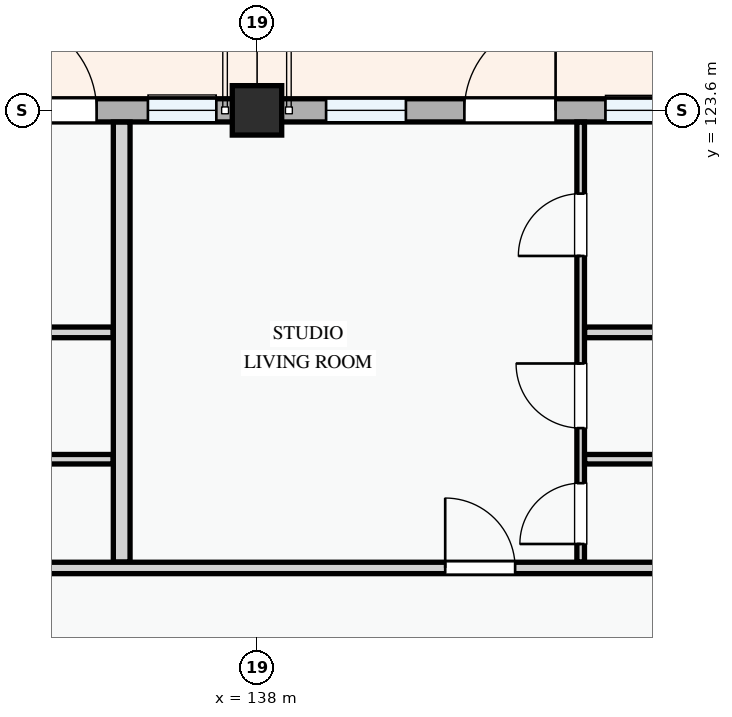
"""IFC4 building model, lengths in metres.
Left out: names, types, materials, properties, quantities, classifications, styles, units other than length and angle.
Written with IfcOpenShell. Run it as: python <this file> out.ifc"""

import sys

from ifc_helpers import new_model, si_unit, direction, frame, frame_2d, origin, origin_2d, place, context, subcontext, project, spatial, rectangle, extrude, element, fill, save


model = new_model("IFC4")
c1 = context("Model", 3, precision=1e-05, world=origin(), true_north=direction((0.0, 1.0)))
c2 = subcontext(c1, "Body", "Model", "MODEL_VIEW")
j1 = project(units=[si_unit("LENGTHUNIT", "METRE"), si_unit("PLANEANGLEUNIT", "RADIAN")], contexts=[c1])
p1 = place(None, origin())
s1 = spatial("IfcSite", under=j1, at=p1, CompositionType="ELEMENT")
p2 = place(p1, origin())
s2 = spatial("IfcBuilding", under=s1, at=p2, CompositionType="ELEMENT")
p3 = place(p2, frame((0.0, 0.0, 21.3)))
s3 = spatial("IfcBuildingStorey", under=s2, at=p3, CompositionType="ELEMENT", Elevation=21.3)
p4 = place(p3, frame((138.0, 123.6, 0.0), z_axis=(0.0, 0.0, 1.0), x_axis=(1.0, 0.0, 0.0)))
e1 = element("IfcColumn", 1, at=p4, inside=s3, PredefinedType="COLUMN", context=c2, shape_type="SweptSolid", body=[
    extrude(rectangle(XDim=0.65, YDim=0.65, at=origin_2d()), origin(), (0.0, 0.0, 1.0), 3.3),
])
p5 = place(p3, frame((144.0, 123.6, 0.0), z_axis=(0.0, 0.0, 1.0), x_axis=(-1.0, 0.0, 0.0)))
e2 = element("IfcWall", 2, at=p5, inside=s3, PredefinedType="STANDARD", context=c2, shape_type="SweptSolid", body=[
    extrude(rectangle(XDim=6.0, YDim=0.305, at=frame_2d((3.0, 0.0))), origin(), (0.0, 0.0, 1.0), 2.445),
])
p6 = place(p5, frame((2.072, 0.0, 0.0)))
e3 = element("IfcOpeningElement", 3, at=p6, cuts=e2, PredefinedType="OPENING", context=c2, shape_type="SweptSolid", body=[
    extrude(rectangle(XDim=1.2, YDim=2.15, at=frame_2d((0.6, 1.075))), frame((0.0, 0.163, 0.0), z_axis=(0.0, -1.0, 0.0), x_axis=(1.0, 0.0, 0.0)), (0.0, 0.0, 1.0), 0.325),
])
p7 = place(p5, frame((0.516, 0.0, 0.78)))
e4 = element("IfcOpeningElement", 4, at=p7, cuts=e2, PredefinedType="OPENING", context=c2, shape_type="SweptSolid", body=[
    extrude(rectangle(XDim=0.9, YDim=1.2, at=frame_2d((0.45, 0.6))), frame((0.0, 0.163, 0.0), z_axis=(0.0, -1.0, 0.0), x_axis=(1.0, 0.0, 0.0)), (0.0, 0.0, 1.0), 0.325),
])
p8 = place(p5, frame((4.041, 0.0, 0.78)))
e5 = element("IfcOpeningElement", 5, at=p8, cuts=e2, PredefinedType="OPENING", context=c2, shape_type="SweptSolid", body=[
    extrude(rectangle(XDim=1.05, YDim=1.2, at=frame_2d((0.525, 0.6))), frame((0.0, 0.163, 0.0), z_axis=(0.0, -1.0, 0.0), x_axis=(1.0, 0.0, 0.0)), (0.0, 0.0, 1.0), 0.325),
])
p9 = place(p3, frame((138.0, 123.6, 0.0), z_axis=(0.0, 0.0, 1.0), x_axis=(-1.0, 0.0, 0.0)))
e6 = element("IfcWall", 6, at=p9, inside=s3, PredefinedType="STANDARD", context=c2, shape_type="SweptSolid", body=[
    extrude(rectangle(XDim=8.4, YDim=0.305, at=frame_2d((4.2, 0.0))), origin(), (0.0, 0.0, 1.0), 2.345),
])
p10 = place(p9, frame((2.11, 0.0, 0.0)))
e7 = element("IfcOpeningElement", 7, at=p10, cuts=e6, PredefinedType="OPENING", context=c2, shape_type="SweptSolid", body=[
    extrude(rectangle(XDim=1.25, YDim=2.2, at=frame_2d((0.625, 1.1))), frame((0.0, 0.163, 0.0), z_axis=(0.0, -1.0, 0.0), x_axis=(1.0, 0.0, 0.0)), (0.0, 0.0, 1.0), 0.325),
])
p11 = place(p9, frame((0.535, 0.0, 0.78)))
e8 = element("IfcOpeningElement", 8, at=p11, cuts=e6, PredefinedType="OPENING", context=c2, shape_type="SweptSolid", body=[
    extrude(rectangle(XDim=0.9, YDim=1.2, at=frame_2d((0.45, 0.6))), frame((0.0, 0.163, 0.0), z_axis=(0.0, -1.0, 0.0), x_axis=(1.0, 0.0, 0.0)), (0.0, 0.0, 1.0), 0.325),
])
p12 = place(p9, frame((4.02, 0.0, 0.78)))
e9 = element("IfcOpeningElement", 9, at=p12, cuts=e6, PredefinedType="OPENING", context=c2, shape_type="SweptSolid", body=[
    extrude(rectangle(XDim=1.25, YDim=1.3, at=frame_2d((0.625, 0.65))), frame((0.0, 0.163, 0.0), z_axis=(0.0, -1.0, 0.0), x_axis=(1.0, 0.0, 0.0)), (0.0, 0.0, 1.0), 0.325),
])
p13 = place(p9, frame((6.085, 0.0, 0.78)))
e10 = element("IfcOpeningElement", 10, at=p13, cuts=e6, PredefinedType="OPENING", context=c2, shape_type="SweptSolid", body=[
    extrude(rectangle(XDim=1.78, YDim=1.42, at=frame_2d((0.89, 0.71))), frame((0.0, 0.163, 0.0), z_axis=(0.0, -1.0, 0.0), x_axis=(1.0, 0.0, 0.0)), (0.0, 0.0, 1.0), 0.325),
])
p14 = place(p3, frame((127.541, 120.679, 0.0), z_axis=(0.0, 0.0, 1.0), x_axis=(1.0, 0.0, 0.0)))
e11 = element("IfcWall", 11, at=p14, inside=s3, PredefinedType="PARTITIONING", context=c2, shape_type="SweptSolid", body=[
    extrude(rectangle(XDim=8.567, YDim=0.14, at=frame_2d((4.283, 0.0))), origin(), (0.0, 0.0, 1.0), 3.0),
])
p15 = place(p3, frame((127.541, 119.01, 0.0), z_axis=(0.0, 0.0, 1.0), x_axis=(1.0, 0.0, 0.0)))
e12 = element("IfcWall", 12, at=p15, inside=s3, PredefinedType="PARTITIONING", context=c2, shape_type="SweptSolid", body=[
    extrude(rectangle(XDim=8.567, YDim=0.125, at=frame_2d((4.283, 0.0))), origin(), (0.0, 0.0, 1.0), 3.0),
])
p16 = place(p3, frame((142.258, 117.657, 0.0), z_axis=(0.0, 0.0, 1.0), x_axis=(0.0, 1.0, 0.0)))
e13 = element("IfcWall", 13, at=p16, inside=s3, PredefinedType="PARTITIONING", context=c2, shape_type="SweptSolid", body=[
    extrude(rectangle(XDim=5.789, YDim=0.1, at=frame_2d((2.894, 0.0))), origin(), (0.0, 0.0, 1.0), 3.0),
])
p17 = place(p16, frame((0.238, 0.0, 0.0)))
e14 = element("IfcOpeningElement", 14, at=p17, cuts=e13, PredefinedType="OPENING", context=c2, shape_type="SweptSolid", body=[
    extrude(rectangle(XDim=0.8, YDim=2.1, at=frame_2d((0.4, 1.05))), frame((0.0, 0.06, 0.0), z_axis=(0.0, -1.0, 0.0), x_axis=(1.0, 0.0, 0.0)), (0.0, 0.0, 1.0), 0.12),
])
p18 = place(p16, frame((1.763, 0.0, 0.0)))
e15 = element("IfcOpeningElement", 15, at=p18, cuts=e13, PredefinedType="OPENING", context=c2, shape_type="SweptSolid", body=[
    extrude(rectangle(XDim=0.85, YDim=2.1, at=frame_2d((0.425, 1.05))), frame((0.0, 0.06, 0.0), z_axis=(0.0, -1.0, 0.0), x_axis=(1.0, 0.0, 0.0)), (0.0, 0.0, 1.0), 0.12),
])
p19 = place(p16, frame((4.028, 0.0, 0.0)))
e16 = element("IfcOpeningElement", 16, at=p19, cuts=e13, PredefinedType="OPENING", context=c2, shape_type="SweptSolid", body=[
    extrude(rectangle(XDim=0.82, YDim=2.08, at=frame_2d((0.41, 1.04))), frame((0.0, 0.06, 0.0), z_axis=(0.0, -1.0, 0.0), x_axis=(1.0, 0.0, 0.0)), (0.0, 0.0, 1.0), 0.12),
])
p20 = place(p3, frame((142.31, 120.679, 0.0), z_axis=(0.0, 0.0, 1.0), x_axis=(1.0, 0.0, 0.0)))
e17 = element("IfcWall", 17, at=p20, inside=s3, PredefinedType="PARTITIONING", context=c2, shape_type="SweptSolid", body=[
    extrude(rectangle(XDim=7.74, YDim=0.14, at=frame_2d((3.87, 0.0))), origin(), (0.0, 0.0, 1.0), 3.0),
])
p21 = place(p3, frame((142.31, 119.01, 0.0), z_axis=(0.0, 0.0, 1.0), x_axis=(1.0, 0.0, 0.0)))
e18 = element("IfcWall", 18, at=p21, inside=s3, PredefinedType="PARTITIONING", context=c2, shape_type="SweptSolid", body=[
    extrude(rectangle(XDim=7.74, YDim=0.125, at=frame_2d((3.87, 0.0))), origin(), (0.0, 0.0, 1.0), 3.0),
])
p22 = place(p3, frame((136.22, 117.657, 0.0), z_axis=(0.0, 0.0, 1.0), x_axis=(0.0, 1.0, 0.0)))
e19 = element("IfcWall", 19, at=p22, inside=s3, PredefinedType="PARTITIONING", context=c2, shape_type="SweptSolid", body=[
    extrude(rectangle(XDim=5.789, YDim=0.22, at=frame_2d((2.894, 0.0))), origin(), (0.0, 0.0, 1.0), 3.0),
])
p23 = place(p3, frame((80.554, 117.58, 0.0), z_axis=(0.0, 0.0, 1.0), x_axis=(1.0, 0.0, 0.0)))
e20 = element("IfcWall", 20, at=p23, inside=s3, PredefinedType="PARTITIONING", context=c2, shape_type="SweptSolid", body=[
    extrude(rectangle(XDim=71.986, YDim=0.15, at=frame_2d((35.993, 0.0))), origin(), (0.0, 0.0, 1.0), 3.0),
])
p24 = place(p23, frame((2.254, 0.0, 0.0)))
e21 = element("IfcOpeningElement", 21, at=p24, cuts=e20, PredefinedType="OPENING", context=c2, shape_type="SweptSolid", body=[
    extrude(rectangle(XDim=0.92, YDim=2.1, at=frame_2d((0.46, 1.05))), frame((0.0, 0.085, 0.0), z_axis=(0.0, -1.0, 0.0), x_axis=(1.0, 0.0, 0.0)), (0.0, 0.0, 1.0), 0.17),
])
p25 = place(p23, frame((23.937, 0.0, 0.0)))
e22 = element("IfcOpeningElement", 22, at=p25, cuts=e20, PredefinedType="OPENING", context=c2, shape_type="SweptSolid", body=[
    extrude(rectangle(XDim=0.96, YDim=2.12, at=frame_2d((0.48, 1.06))), frame((0.0, 0.085, 0.0), z_axis=(0.0, -1.0, 0.0), x_axis=(1.0, 0.0, 0.0)), (0.0, 0.0, 1.0), 0.17),
])
p26 = place(p23, frame((39.125, 0.0, 0.0)))
e23 = element("IfcOpeningElement", 23, at=p26, cuts=e20, PredefinedType="OPENING", context=c2, shape_type="SweptSolid", body=[
    extrude(rectangle(XDim=0.92, YDim=2.1, at=frame_2d((0.46, 1.05))), frame((0.0, 0.085, 0.0), z_axis=(0.0, -1.0, 0.0), x_axis=(1.0, 0.0, 0.0)), (0.0, 0.0, 1.0), 0.17),
])
p27 = place(p23, frame((59.922, 0.0, 0.0)))
e24 = element("IfcOpeningElement", 24, at=p27, cuts=e20, PredefinedType="OPENING", context=c2, shape_type="SweptSolid", body=[
    extrude(rectangle(XDim=0.92, YDim=2.1, at=frame_2d((0.46, 1.05))), frame((0.0, 0.085, 0.0), z_axis=(0.0, -1.0, 0.0), x_axis=(1.0, 0.0, 0.0)), (0.0, 0.0, 1.0), 0.17),
])
p28 = place(p6, frame((1.2, 0.0, 0.0), z_axis=(0.0, 0.0, 1.0), x_axis=(-1.0, 0.0, 0.0)))
e25 = element("IfcDoor", 25, at=p28, inside=s3, OperationType="SINGLE_SWING_RIGHT", PredefinedType="DOOR", context=c2, shape_type="SweptSolid", body=[
    extrude(rectangle(XDim=1.2, YDim=2.15, at=frame_2d((0.6, 1.075))), frame((0.0, 0.025, 0.0), z_axis=(0.0, -1.0, 0.0), x_axis=(1.0, 0.0, 0.0)), (0.0, 0.0, 1.0), 0.05),
])
fill(e3, e25)
p29 = place(p7, origin())
e26 = element("IfcWindow", 26, at=p29, inside=s3, PartitioningType="SINGLE_PANEL", PredefinedType="WINDOW", context=c2, shape_type="SweptSolid", body=[
    extrude(rectangle(XDim=0.9, YDim=1.2, at=frame_2d((0.45, 0.6))), frame((0.0, 0.03, 0.0), z_axis=(0.0, -1.0, 0.0), x_axis=(1.0, 0.0, 0.0)), (0.0, 0.0, 1.0), 0.06),
])
fill(e4, e26)
p30 = place(p8, origin())
e27 = element("IfcWindow", 27, at=p30, inside=s3, PartitioningType="SINGLE_PANEL", PredefinedType="WINDOW", context=c2, shape_type="SweptSolid", body=[
    extrude(rectangle(XDim=1.05, YDim=1.2, at=frame_2d((0.525, 0.6))), frame((0.0, 0.03, 0.0), z_axis=(0.0, -1.0, 0.0), x_axis=(1.0, 0.0, 0.0)), (0.0, 0.0, 1.0), 0.06),
])
fill(e5, e27)
p31 = place(p10, frame((1.25, 0.0, 0.0), z_axis=(0.0, 0.0, 1.0), x_axis=(-1.0, 0.0, 0.0)))
e28 = element("IfcDoor", 28, at=p31, inside=s3, OperationType="SINGLE_SWING_LEFT", PredefinedType="DOOR", context=c2, shape_type="SweptSolid", body=[
    extrude(rectangle(XDim=1.25, YDim=2.2, at=frame_2d((0.625, 1.1))), frame((0.0, 0.025, 0.0), z_axis=(0.0, -1.0, 0.0), x_axis=(1.0, 0.0, 0.0)), (0.0, 0.0, 1.0), 0.05),
])
fill(e7, e28)
p32 = place(p11, origin())
e29 = element("IfcWindow", 29, at=p32, inside=s3, PartitioningType="SINGLE_PANEL", PredefinedType="WINDOW", context=c2, shape_type="SweptSolid", body=[
    extrude(rectangle(XDim=0.9, YDim=1.2, at=frame_2d((0.45, 0.6))), frame((0.0, 0.03, 0.0), z_axis=(0.0, -1.0, 0.0), x_axis=(1.0, 0.0, 0.0)), (0.0, 0.0, 1.0), 0.06),
])
fill(e8, e29)
p33 = place(p17, origin())
e30 = element("IfcDoor", 30, at=p33, inside=s3, OperationType="SINGLE_SWING_LEFT", PredefinedType="DOOR", context=c2, shape_type="SweptSolid", body=[
    extrude(rectangle(XDim=0.8, YDim=2.1, at=frame_2d((0.4, 1.05))), frame((0.0, 0.025, 0.0), z_axis=(0.0, -1.0, 0.0), x_axis=(1.0, 0.0, 0.0)), (0.0, 0.0, 1.0), 0.05),
])
fill(e14, e30)
p34 = place(p18, origin())
e31 = element("IfcDoor", 31, at=p34, inside=s3, OperationType="SINGLE_SWING_RIGHT", PredefinedType="DOOR", context=c2, shape_type="SweptSolid", body=[
    extrude(rectangle(XDim=0.85, YDim=2.1, at=frame_2d((0.425, 1.05))), frame((0.0, 0.025, 0.0), z_axis=(0.0, -1.0, 0.0), x_axis=(1.0, 0.0, 0.0)), (0.0, 0.0, 1.0), 0.05),
])
fill(e15, e31)
p35 = place(p19, origin())
e32 = element("IfcDoor", 32, at=p35, inside=s3, OperationType="SINGLE_SWING_LEFT", PredefinedType="DOOR", context=c2, shape_type="SweptSolid", body=[
    extrude(rectangle(XDim=0.82, YDim=2.08, at=frame_2d((0.41, 1.04))), frame((0.0, 0.025, 0.0), z_axis=(0.0, -1.0, 0.0), x_axis=(1.0, 0.0, 0.0)), (0.0, 0.0, 1.0), 0.05),
])
fill(e16, e32)
p36 = place(p27, origin())
e33 = element("IfcDoor", 33, at=p36, inside=s3, OperationType="SINGLE_SWING_LEFT", PredefinedType="DOOR", context=c2, shape_type="SweptSolid", body=[
    extrude(rectangle(XDim=0.92, YDim=2.1, at=frame_2d((0.46, 1.05))), frame((0.0, 0.025, 0.0), z_axis=(0.0, -1.0, 0.0), x_axis=(1.0, 0.0, 0.0)), (0.0, 0.0, 1.0), 0.05),
])
fill(e24, e33)
save(model, sys.argv[1])
